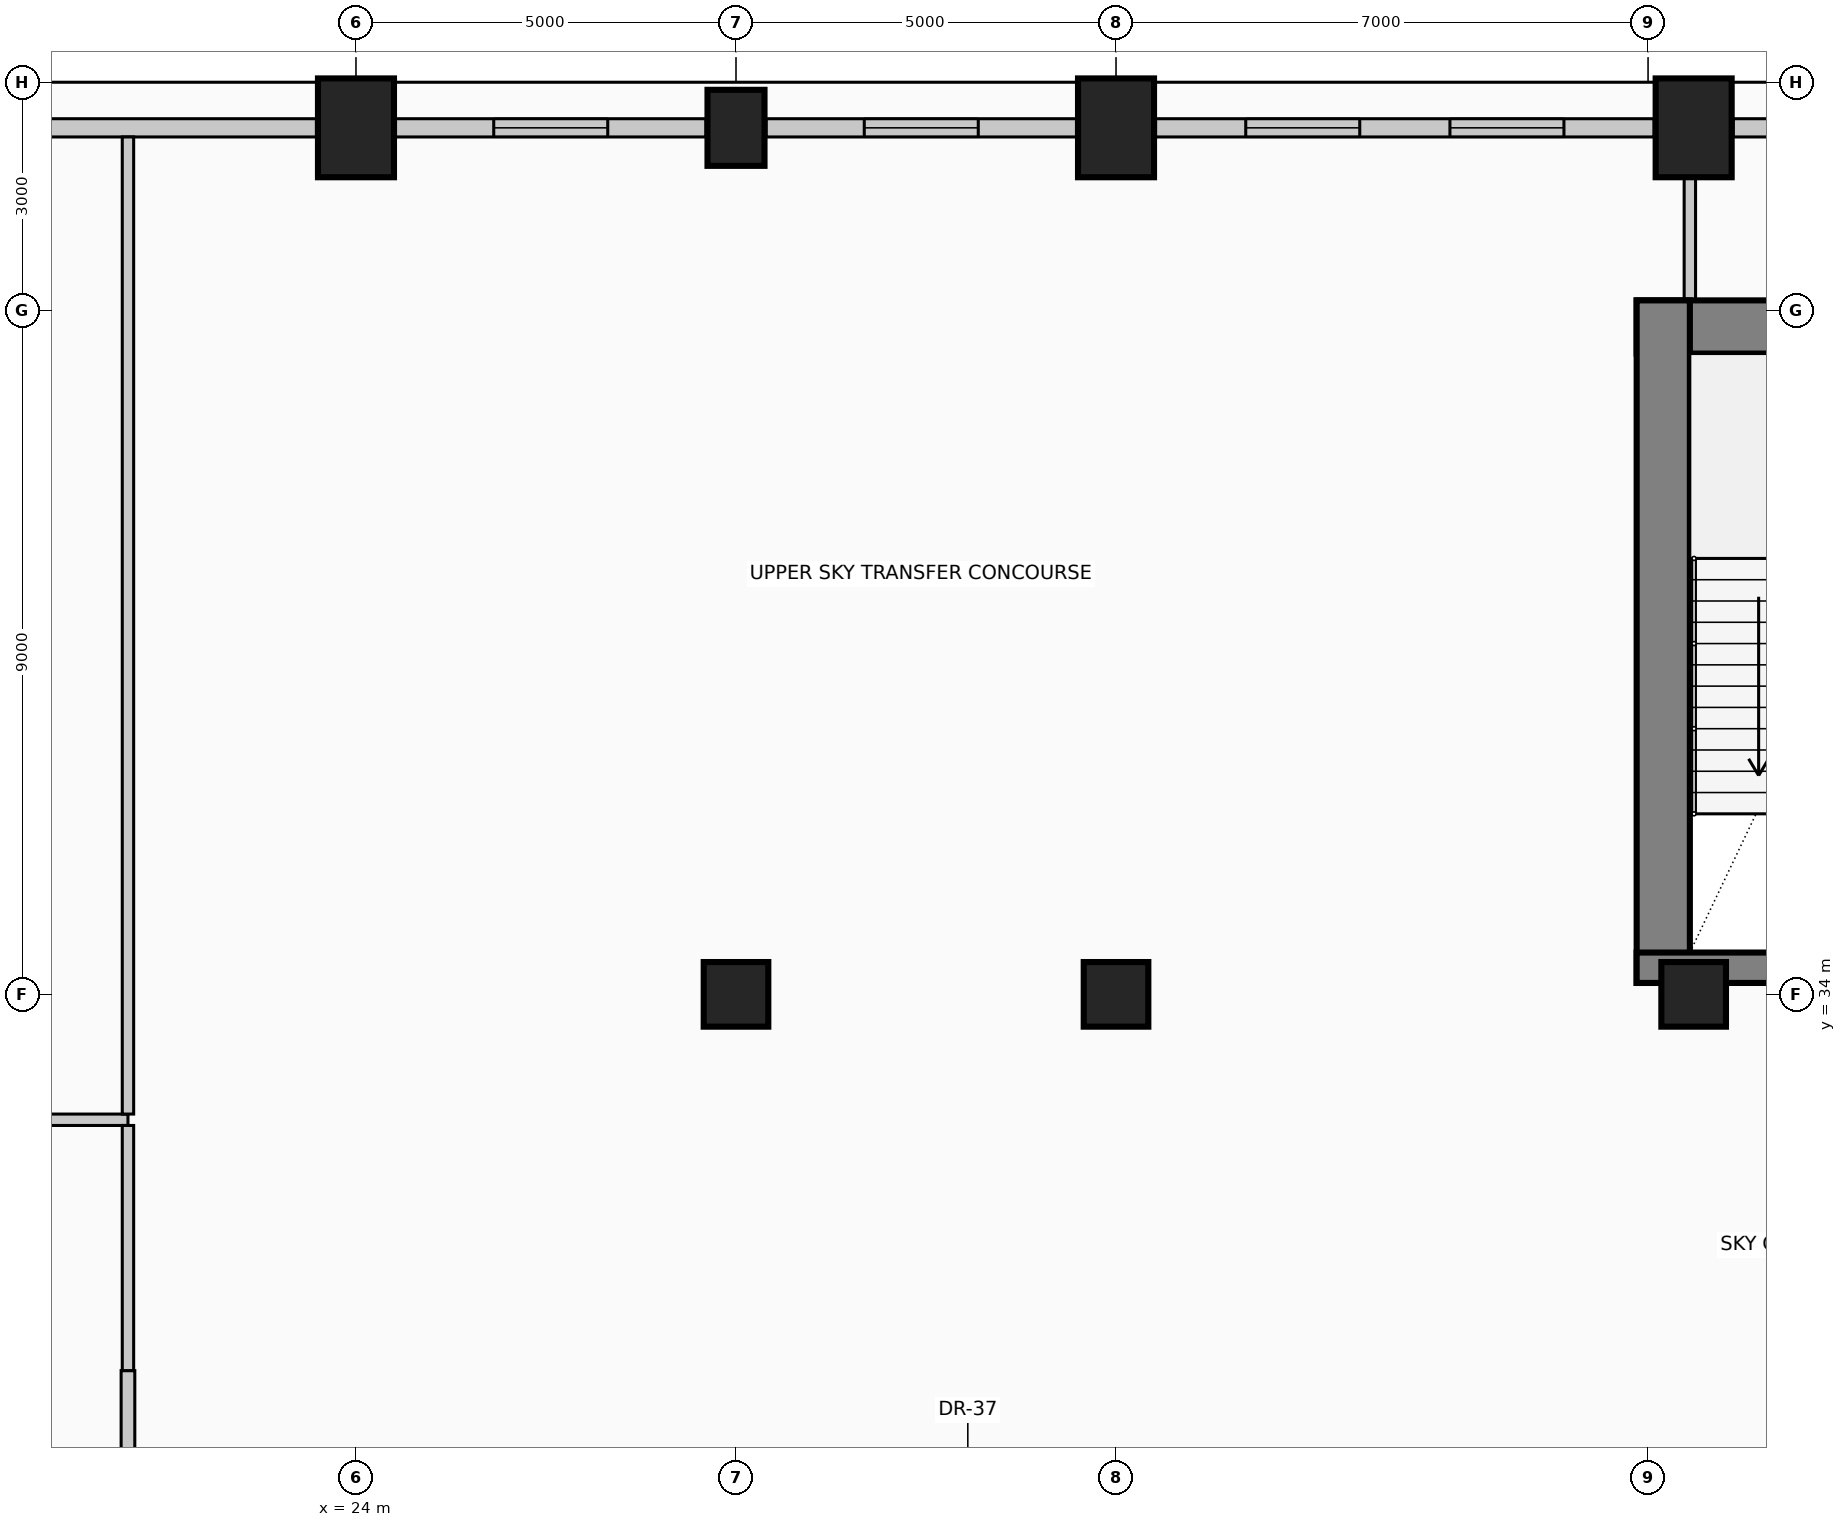
"""IFC4 building model, lengths in metres.
Left out: names, types, materials, properties, quantities, classifications, styles, units other than length and angle.
Written with IfcOpenShell. Run it as: python <this file> out.ifc"""

import sys

from ifc_helpers import new_model, si_unit, direction, frame, frame_2d, origin, origin_2d, place, context, subcontext, project, spatial, rectangle, circle, extrude, element, fill, save


model = new_model("IFC4")
c1 = context("Model", 3, precision=1e-05, world=origin(), true_north=direction((0.0, 1.0)))
c2 = subcontext(c1, "Body", "Model", "MODEL_VIEW")
j1 = project(units=[si_unit("LENGTHUNIT", "METRE"), si_unit("PLANEANGLEUNIT", "RADIAN")], contexts=[c1])
p1 = place(None, origin())
s1 = spatial("IfcSite", under=j1, at=p1, CompositionType="ELEMENT")
p2 = place(p1, origin())
s2 = spatial("IfcBuilding", under=s1, at=p2, CompositionType="ELEMENT")
p3 = place(p2, frame((0.0, 0.0, 243.8)))
s3 = spatial("IfcBuildingStorey", under=s2, at=p3, CompositionType="ELEMENT", Elevation=243.8)
p4 = place(p3, frame((40.85, 42.78, 0.0), z_axis=(0.0, 0.0, 1.0), x_axis=(1.0, 0.0, 0.0)))
e1 = element("IfcWall", 1, at=p4, inside=s3, PredefinedType="SHEAR", context=c2, shape_type="SweptSolid", body=[
    extrude(rectangle(XDim=14.3, YDim=0.7, at=frame_2d((7.15, 0.0))), origin(), (0.0, 0.0, 1.0), 4.8),
])
p5 = place(p3, frame((41.2, 34.15, 0.0), z_axis=(0.0, 0.0, 1.0), x_axis=(0.0, 1.0, 0.0)))
e2 = element("IfcWall", 2, at=p5, inside=s3, PredefinedType="SHEAR", context=c2, shape_type="SweptSolid", body=[
    extrude(rectangle(XDim=8.98, YDim=0.7, at=frame_2d((4.49, 0.0))), origin(), (0.0, 0.0, 1.0), 4.8),
])
p6 = place(p3, frame((40.85, 34.35, 0.0), z_axis=(0.0, 0.0, 1.0), x_axis=(1.0, 0.0, 0.0)))
e3 = element("IfcWall", 3, at=p6, inside=s3, PredefinedType="SHEAR", context=c2, shape_type="SweptSolid", body=[
    extrude(rectangle(XDim=4.86, YDim=0.4, at=frame_2d((2.43, 0.0))), origin(), (0.0, 0.0, 1.0), 4.8),
])
p7 = place(p6, frame((2.4, 0.0, 0.0)))
e4 = element("IfcOpeningElement", 4, at=p7, cuts=e3, PredefinedType="OPENING", context=c2, shape_type="SweptSolid", body=[
    extrude(rectangle(XDim=1.15, YDim=2.2, at=frame_2d((0.575, 1.1))), frame((0.0, 0.21, 0.0), z_axis=(0.0, -1.0, 0.0), x_axis=(1.0, 0.0, 0.0)), (0.0, 0.0, 1.0), 0.42),
])
p8 = place(p3, frame((24.0, 45.4, 0.0), z_axis=(0.0, 0.0, 1.0), x_axis=(1.0, 0.0, 0.0)))
e5 = element("IfcColumn", 5, at=p8, inside=s3, PredefinedType="COLUMN", context=c2, shape_type="SweptSolid", body=[
    extrude(rectangle(XDim=1.0, YDim=1.3, at=origin_2d()), origin(), (0.0, 0.0, 1.0), 4.8),
])
p9 = place(p3, frame((29.0, 45.4, 0.0), z_axis=(0.0, 0.0, 1.0), x_axis=(1.0, 0.0, 0.0)))
e6 = element("IfcColumn", 6, at=p9, inside=s3, PredefinedType="COLUMN", context=c2, shape_type="SweptSolid", body=[
    extrude(rectangle(XDim=0.75, YDim=1.0, at=origin_2d()), origin(), (0.0, 0.0, 1.0), 4.8),
])
for number, where, z_axis, x_axis in (
    (7, (34.0, 45.4, 0.0), (0.0, 0.0, 1.0), (1.0, 0.0, 0.0)),
    (8, (41.6, 45.4, 0.0), (0.0, 0.0, 1.0), (1.0, 0.0, 0.0)),
):
    element("IfcColumn", number, at=place(p3, frame(where, z_axis=z_axis, x_axis=x_axis)), inside=s3, PredefinedType="COLUMN", context=c2, shape_type="SweptSolid", body=[
        extrude(rectangle(XDim=1.0, YDim=1.3, at=origin_2d()), origin(), (0.0, 0.0, 1.0), 4.8),
    ])
for number, where, z_axis, x_axis in (
    (9, (29.0, 34.0, 0.0), (0.0, 0.0, 1.0), (1.0, 0.0, 0.0)),
    (10, (41.6, 34.0, 0.0), (0.0, 0.0, 1.0), (1.0, 0.0, 0.0)),
    (11, (34.0, 34.0, 0.0), (0.0, 0.0, 1.0), (1.0, 0.0, 0.0)),
):
    element("IfcColumn", number, at=place(p3, frame(where, z_axis=z_axis, x_axis=x_axis)), inside=s3, PredefinedType="COLUMN", context=c2, shape_type="SweptSolid", body=[
        extrude(circle(Radius=0.425, at=origin_2d()), origin(), (0.0, 0.0, 1.0), 4.8),
    ])
p10 = place(p3, frame((16.92, 45.4, 0.0), z_axis=(0.0, 0.0, 1.0), x_axis=(1.0, 0.0, 0.0)))
e12 = element("IfcWall", 12, at=p10, inside=s3, PredefinedType="SOLIDWALL", context=c2, shape_type="SweptSolid", body=[
    extrude(rectangle(XDim=6.56, YDim=0.24, at=frame_2d((3.28, 0.0))), origin(), (0.0, 0.0, 1.0), 3.8),
])
p11 = place(p10, frame((1.187, 0.0, 0.42)))
e13 = element("IfcOpeningElement", 13, at=p11, cuts=e12, PredefinedType="OPENING", context=c2, shape_type="SweptSolid", body=[
    extrude(rectangle(XDim=1.5, YDim=2.2, at=frame_2d((0.75, 1.1))), frame((0.0, 0.13, 0.0), z_axis=(0.0, -1.0, 0.0), x_axis=(1.0, 0.0, 0.0)), (0.0, 0.0, 1.0), 0.26),
])
p12 = place(p3, frame((24.52, 45.4, 0.0), z_axis=(0.0, 0.0, 1.0), x_axis=(1.0, 0.0, 0.0)))
e14 = element("IfcWall", 14, at=p12, inside=s3, PredefinedType="SOLIDWALL", context=c2, shape_type="SweptSolid", body=[
    extrude(rectangle(XDim=4.085, YDim=0.24, at=frame_2d((2.042, 0.0))), origin(), (0.0, 0.0, 1.0), 3.8),
])
p13 = place(p12, frame((1.292, 0.0, 0.42)))
e15 = element("IfcOpeningElement", 15, at=p13, cuts=e14, PredefinedType="OPENING", context=c2, shape_type="SweptSolid", body=[
    extrude(rectangle(XDim=1.5, YDim=2.2, at=frame_2d((0.75, 1.1))), frame((0.0, 0.13, 0.0), z_axis=(0.0, -1.0, 0.0), x_axis=(1.0, 0.0, 0.0)), (0.0, 0.0, 1.0), 0.26),
])
p14 = place(p3, frame((29.395, 45.4, 0.0), z_axis=(0.0, 0.0, 1.0), x_axis=(1.0, 0.0, 0.0)))
e16 = element("IfcWall", 16, at=p14, inside=s3, PredefinedType="SOLIDWALL", context=c2, shape_type="SweptSolid", body=[
    extrude(rectangle(XDim=4.085, YDim=0.24, at=frame_2d((2.042, 0.0))), origin(), (0.0, 0.0, 1.0), 3.8),
])
p15 = place(p14, frame((1.292, 0.0, 0.42)))
e17 = element("IfcOpeningElement", 17, at=p15, cuts=e16, PredefinedType="OPENING", context=c2, shape_type="SweptSolid", body=[
    extrude(rectangle(XDim=1.5, YDim=2.2, at=frame_2d((0.75, 1.1))), frame((0.0, 0.13, 0.0), z_axis=(0.0, -1.0, 0.0), x_axis=(1.0, 0.0, 0.0)), (0.0, 0.0, 1.0), 0.26),
])
p16 = place(p3, frame((34.52, 45.4, 0.0), z_axis=(0.0, 0.0, 1.0), x_axis=(1.0, 0.0, 0.0)))
e18 = element("IfcWall", 18, at=p16, inside=s3, PredefinedType="SOLIDWALL", context=c2, shape_type="SweptSolid", body=[
    extrude(rectangle(XDim=6.56, YDim=0.24, at=frame_2d((3.28, 0.0))), origin(), (0.0, 0.0, 1.0), 3.8),
])
p17 = place(p16, frame((1.187, 0.0, 0.42)))
e19 = element("IfcOpeningElement", 19, at=p17, cuts=e18, PredefinedType="OPENING", context=c2, shape_type="SweptSolid", body=[
    extrude(rectangle(XDim=1.5, YDim=2.2, at=frame_2d((0.75, 1.1))), frame((0.0, 0.13, 0.0), z_axis=(0.0, -1.0, 0.0), x_axis=(1.0, 0.0, 0.0)), (0.0, 0.0, 1.0), 0.26),
])
p18 = place(p16, frame((3.873, 0.0, 0.42)))
e20 = element("IfcOpeningElement", 20, at=p18, cuts=e18, PredefinedType="OPENING", context=c2, shape_type="SweptSolid", body=[
    extrude(rectangle(XDim=1.5, YDim=2.2, at=frame_2d((0.75, 1.1))), frame((0.0, 0.13, 0.0), z_axis=(0.0, -1.0, 0.0), x_axis=(1.0, 0.0, 0.0)), (0.0, 0.0, 1.0), 0.26),
])
p19 = place(p3, frame((42.12, 45.4, 0.0), z_axis=(0.0, 0.0, 1.0), x_axis=(1.0, 0.0, 0.0)))
e21 = element("IfcWall", 21, at=p19, inside=s3, PredefinedType="SOLIDWALL", context=c2, shape_type="SweptSolid", body=[
    extrude(rectangle(XDim=1.485, YDim=0.24, at=frame_2d((0.742, 0.0))), origin(), (0.0, 0.0, 1.0), 3.8),
])
p20 = place(p3, frame((15.85, 32.35, 0.0), z_axis=(0.0, 0.0, 1.0), x_axis=(1.0, 0.0, 0.0)))
e22 = element("IfcWall", 22, at=p20, inside=s3, PredefinedType="PARTITIONING", context=c2, shape_type="SweptSolid", body=[
    extrude(rectangle(XDim=5.15, YDim=0.15, at=frame_2d((2.575, 0.0))), origin(), (0.0, 0.0, 1.0), 4.55),
])
p21 = place(p3, frame((21.0, 26.9, 0.0), z_axis=(0.0, 0.0, 1.0), x_axis=(0.0, 1.0, 0.0)))
e23 = element("IfcWall", 23, at=p21, inside=s3, PredefinedType="PARTITIONING", context=c2, shape_type="SweptSolid", body=[
    extrude(rectangle(XDim=2.15, YDim=0.18, at=frame_2d((1.075, 0.0))), origin(), (0.0, 0.0, 1.0), 4.55),
])
p22 = place(p3, frame((21.0, 29.05, 0.0), z_axis=(0.0, 0.0, 1.0), x_axis=(0.0, 1.0, 0.0)))
e24 = element("IfcWall", 24, at=p22, inside=s3, PredefinedType="PARTITIONING", context=c2, shape_type="SweptSolid", body=[
    extrude(rectangle(XDim=3.225, YDim=0.15, at=frame_2d((1.612, 0.0))), origin(), (0.0, 0.0, 1.0), 4.55),
])
p23 = place(p3, frame((21.0, 32.425, 0.0), z_axis=(0.0, 0.0, 1.0), x_axis=(0.0, 1.0, 0.0)))
e25 = element("IfcWall", 25, at=p23, inside=s3, PredefinedType="PARTITIONING", context=c2, shape_type="SweptSolid", body=[
    extrude(rectangle(XDim=12.855, YDim=0.15, at=frame_2d((6.427, 0.0))), origin(), (0.0, 0.0, 1.0), 4.55),
])
p24 = place(p3, frame((41.55, 43.13, 0.0), z_axis=(0.0, 0.0, 1.0), x_axis=(0.0, 1.0, 0.0)))
e26 = element("IfcWall", 26, at=p24, inside=s3, PredefinedType="PARTITIONING", context=c2, shape_type="SweptSolid", body=[
    extrude(rectangle(XDim=1.62, YDim=0.15, at=frame_2d((0.81, 0.0))), origin(), (0.0, 0.0, 1.0), 4.55),
])
p25 = place(p13, origin())
e27 = element("IfcWindow", 27, at=p25, inside=s3, PartitioningType="SINGLE_PANEL", PredefinedType="WINDOW", context=c2, shape_type="SweptSolid", body=[
    extrude(rectangle(XDim=1.5, YDim=2.2, at=frame_2d((0.75, 1.1))), frame((0.0, 0.03, 0.0), z_axis=(0.0, -1.0, 0.0), x_axis=(1.0, 0.0, 0.0)), (0.0, 0.0, 1.0), 0.06),
])
fill(e15, e27)
p26 = place(p15, origin())
e28 = element("IfcWindow", 28, at=p26, inside=s3, PartitioningType="SINGLE_PANEL", PredefinedType="WINDOW", context=c2, shape_type="SweptSolid", body=[
    extrude(rectangle(XDim=1.5, YDim=2.2, at=frame_2d((0.75, 1.1))), frame((0.0, 0.03, 0.0), z_axis=(0.0, -1.0, 0.0), x_axis=(1.0, 0.0, 0.0)), (0.0, 0.0, 1.0), 0.06),
])
fill(e17, e28)
p27 = place(p17, origin())
e29 = element("IfcWindow", 29, at=p27, inside=s3, PartitioningType="SINGLE_PANEL", PredefinedType="WINDOW", context=c2, shape_type="SweptSolid", body=[
    extrude(rectangle(XDim=1.5, YDim=2.2, at=frame_2d((0.75, 1.1))), frame((0.0, 0.03, 0.0), z_axis=(0.0, -1.0, 0.0), x_axis=(1.0, 0.0, 0.0)), (0.0, 0.0, 1.0), 0.06),
])
fill(e19, e29)
p28 = place(p18, origin())
e30 = element("IfcWindow", 30, at=p28, inside=s3, PartitioningType="SINGLE_PANEL", PredefinedType="WINDOW", context=c2, shape_type="SweptSolid", body=[
    extrude(rectangle(XDim=1.5, YDim=2.2, at=frame_2d((0.75, 1.1))), frame((0.0, 0.03, 0.0), z_axis=(0.0, -1.0, 0.0), x_axis=(1.0, 0.0, 0.0)), (0.0, 0.0, 1.0), 0.06),
])
fill(e20, e30)
save(model, sys.argv[1])
